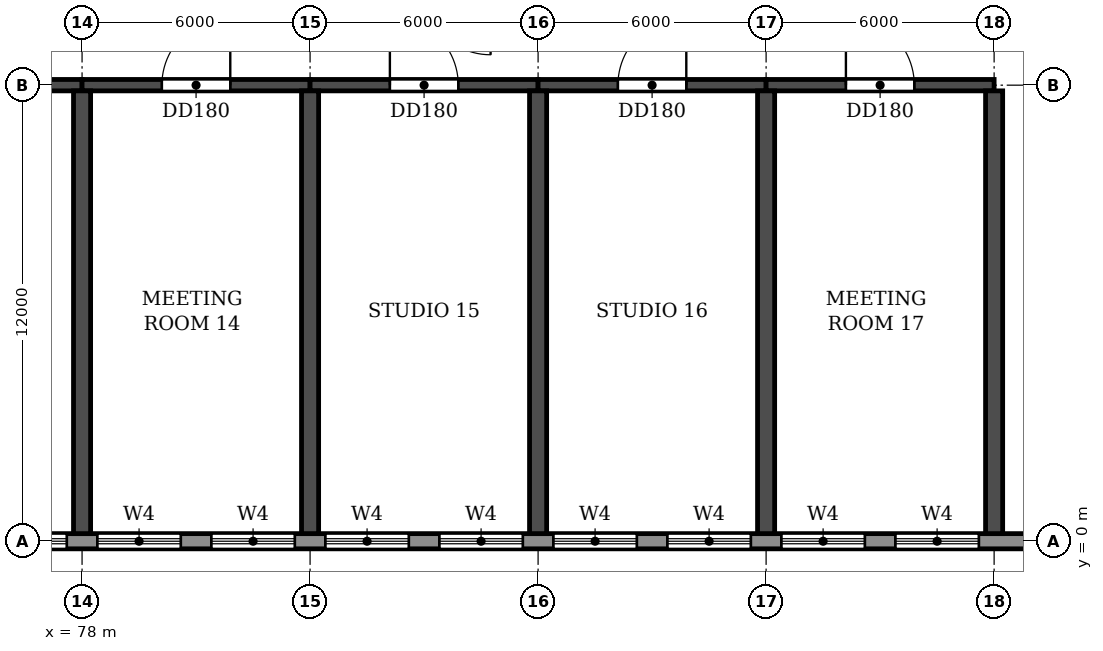
"""IFC4 building model, lengths in metres.
Left out: names, types, materials, properties, quantities, classifications, styles, units other than length and angle.
Written with IfcOpenShell. Run it as: python <this file> out.ifc"""

import sys

from ifc_helpers import new_model, si_unit, direction, frame, frame_2d, origin, place, context, subcontext, project, spatial, rectangle, extrude, element, fill, save


model = new_model("IFC4")
c1 = context("Model", 3, precision=1e-05, world=origin(), true_north=direction((0.0, 1.0)))
c2 = subcontext(c1, "Body", "Model", "MODEL_VIEW")
j1 = project(units=[si_unit("LENGTHUNIT", "METRE"), si_unit("PLANEANGLEUNIT", "RADIAN")], contexts=[c1])
p1 = place(None, origin())
s1 = spatial("IfcSite", under=j1, at=p1, CompositionType="ELEMENT")
p2 = place(p1, origin())
s2 = spatial("IfcBuilding", under=s1, at=p2, CompositionType="ELEMENT")
p3 = place(p2, frame((0.0, 0.0, 19.2)))
s3 = spatial("IfcBuildingStorey", under=s2, at=p3, CompositionType="ELEMENT", Elevation=19.2)
for number, where, z_axis, x_axis in (
    (1, (78.0, 0.2, 0.0), (0.0, 0.0, 1.0), (0.0, 1.0, 0.0)),
    (2, (84.0, 0.2, 0.0), (0.0, 0.0, 1.0), (0.0, 1.0, 0.0)),
    (3, (90.0, 0.2, 0.0), (0.0, 0.0, 1.0), (0.0, 1.0, 0.0)),
    (4, (96.0, 0.2, 0.0), (0.0, 0.0, 1.0), (0.0, 1.0, 0.0)),
    (5, (102.0, 0.2, 0.0), (0.0, 0.0, 1.0), (0.0, 1.0, 0.0)),
):
    element("IfcWall", number, at=place(p3, frame(where, z_axis=z_axis, x_axis=x_axis)), inside=s3, PredefinedType="SHEAR", context=c2, shape_type="SweptSolid", body=[
        extrude(rectangle(XDim=11.65, YDim=0.45, at=frame_2d((5.825, 0.0))), origin(), (0.0, 0.0, 1.0), 3.95),
    ])
p4 = place(p3, frame((72.0, 12.0, 0.0), z_axis=(0.0, 0.0, 1.0), x_axis=(1.0, 0.0, 0.0)))
e6 = element("IfcWall", 6, at=p4, inside=s3, PredefinedType="SHEAR", context=c2, shape_type="SweptSolid", body=[
    extrude(rectangle(XDim=6.0, YDim=0.3, at=frame_2d((3.0, 0.0))), origin(), (0.0, 0.0, 1.0), 3.35),
])
p5 = place(p4, frame((2.1, 0.0, 0.0)))
e7 = element("IfcOpeningElement", 7, at=p5, cuts=e6, PredefinedType="OPENING", context=c2, shape_type="SweptSolid", body=[
    extrude(rectangle(XDim=1.8, YDim=2.1, at=frame_2d((0.9, 1.05))), frame((0.0, 0.16, 0.0), z_axis=(0.0, -1.0, 0.0), x_axis=(1.0, 0.0, 0.0)), (0.0, 0.0, 1.0), 0.32),
])
p6 = place(p3, frame((78.0, 12.0, 0.0), z_axis=(0.0, 0.0, 1.0), x_axis=(1.0, 0.0, 0.0)))
e8 = element("IfcWall", 8, at=p6, inside=s3, PredefinedType="SHEAR", context=c2, shape_type="SweptSolid", body=[
    extrude(rectangle(XDim=6.0, YDim=0.3, at=frame_2d((3.0, 0.0))), origin(), (0.0, 0.0, 1.0), 3.35),
])
p7 = place(p6, frame((2.1, 0.0, 0.0)))
e9 = element("IfcOpeningElement", 9, at=p7, cuts=e8, PredefinedType="OPENING", context=c2, shape_type="SweptSolid", body=[
    extrude(rectangle(XDim=1.8, YDim=2.1, at=frame_2d((0.9, 1.05))), frame((0.0, 0.16, 0.0), z_axis=(0.0, -1.0, 0.0), x_axis=(1.0, 0.0, 0.0)), (0.0, 0.0, 1.0), 0.32),
])
p8 = place(p3, frame((84.0, 12.0, 0.0), z_axis=(0.0, 0.0, 1.0), x_axis=(1.0, 0.0, 0.0)))
e10 = element("IfcWall", 10, at=p8, inside=s3, PredefinedType="SHEAR", context=c2, shape_type="SweptSolid", body=[
    extrude(rectangle(XDim=6.0, YDim=0.3, at=frame_2d((3.0, 0.0))), origin(), (0.0, 0.0, 1.0), 3.35),
])
p9 = place(p8, frame((2.1, 0.0, 0.0)))
e11 = element("IfcOpeningElement", 11, at=p9, cuts=e10, PredefinedType="OPENING", context=c2, shape_type="SweptSolid", body=[
    extrude(rectangle(XDim=1.8, YDim=2.1, at=frame_2d((0.9, 1.05))), frame((0.0, 0.16, 0.0), z_axis=(0.0, -1.0, 0.0), x_axis=(1.0, 0.0, 0.0)), (0.0, 0.0, 1.0), 0.32),
])
p10 = place(p3, frame((90.0, 12.0, 0.0), z_axis=(0.0, 0.0, 1.0), x_axis=(1.0, 0.0, 0.0)))
e12 = element("IfcWall", 12, at=p10, inside=s3, PredefinedType="SHEAR", context=c2, shape_type="SweptSolid", body=[
    extrude(rectangle(XDim=6.0, YDim=0.3, at=frame_2d((3.0, 0.0))), origin(), (0.0, 0.0, 1.0), 3.35),
])
p11 = place(p10, frame((2.1, 0.0, 0.0)))
e13 = element("IfcOpeningElement", 13, at=p11, cuts=e12, PredefinedType="OPENING", context=c2, shape_type="SweptSolid", body=[
    extrude(rectangle(XDim=1.8, YDim=2.1, at=frame_2d((0.9, 1.05))), frame((0.0, 0.16, 0.0), z_axis=(0.0, -1.0, 0.0), x_axis=(1.0, 0.0, 0.0)), (0.0, 0.0, 1.0), 0.32),
])
p12 = place(p3, frame((96.0, 12.0, 0.0), z_axis=(0.0, 0.0, 1.0), x_axis=(1.0, 0.0, 0.0)))
e14 = element("IfcWall", 14, at=p12, inside=s3, PredefinedType="SHEAR", context=c2, shape_type="SweptSolid", body=[
    extrude(rectangle(XDim=6.0, YDim=0.3, at=frame_2d((3.0, 0.0))), origin(), (0.0, 0.0, 1.0), 3.35),
])
p13 = place(p12, frame((2.1, 0.0, 0.0)))
e15 = element("IfcOpeningElement", 15, at=p13, cuts=e14, PredefinedType="OPENING", context=c2, shape_type="SweptSolid", body=[
    extrude(rectangle(XDim=1.8, YDim=2.1, at=frame_2d((0.9, 1.05))), frame((0.0, 0.16, 0.0), z_axis=(0.0, -1.0, 0.0), x_axis=(1.0, 0.0, 0.0)), (0.0, 0.0, 1.0), 0.32),
])
p14 = place(p3, frame((-3.0, 0.0, 0.0), z_axis=(0.0, 0.0, 1.0), x_axis=(1.0, 0.0, 0.0)))
e16 = element("IfcWall", 16, at=p14, inside=s3, PredefinedType="STANDARD", context=c2, shape_type="SweptSolid", body=[
    extrude(rectangle(XDim=108.0, YDim=0.4, at=frame_2d((54.0, 0.0))), origin(), (0.0, 0.0, 1.0), 3.95),
])
p15 = place(p14, frame((3.4, 0.0, 0.9)))
e17 = element("IfcOpeningElement", 17, at=p15, cuts=e16, PredefinedType="OPENING", context=c2, shape_type="SweptSolid", body=[
    extrude(rectangle(XDim=2.2, YDim=2.7, at=frame_2d((1.1, 1.35))), frame((0.0, 0.21, 0.0), z_axis=(0.0, -1.0, 0.0), x_axis=(1.0, 0.0, 0.0)), (0.0, 0.0, 1.0), 0.42),
])
p16 = place(p14, frame((6.4, 0.0, 0.9)))
e18 = element("IfcOpeningElement", 18, at=p16, cuts=e16, PredefinedType="OPENING", context=c2, shape_type="SweptSolid", body=[
    extrude(rectangle(XDim=2.2, YDim=2.7, at=frame_2d((1.1, 1.35))), frame((0.0, 0.21, 0.0), z_axis=(0.0, -1.0, 0.0), x_axis=(1.0, 0.0, 0.0)), (0.0, 0.0, 1.0), 0.42),
])
p17 = place(p14, frame((9.4, 0.0, 0.9)))
e19 = element("IfcOpeningElement", 19, at=p17, cuts=e16, PredefinedType="OPENING", context=c2, shape_type="SweptSolid", body=[
    extrude(rectangle(XDim=2.2, YDim=2.7, at=frame_2d((1.1, 1.35))), frame((0.0, 0.21, 0.0), z_axis=(0.0, -1.0, 0.0), x_axis=(1.0, 0.0, 0.0)), (0.0, 0.0, 1.0), 0.42),
])
p18 = place(p14, frame((12.4, 0.0, 0.9)))
e20 = element("IfcOpeningElement", 20, at=p18, cuts=e16, PredefinedType="OPENING", context=c2, shape_type="SweptSolid", body=[
    extrude(rectangle(XDim=2.2, YDim=2.7, at=frame_2d((1.1, 1.35))), frame((0.0, 0.21, 0.0), z_axis=(0.0, -1.0, 0.0), x_axis=(1.0, 0.0, 0.0)), (0.0, 0.0, 1.0), 0.42),
])
p19 = place(p14, frame((15.4, 0.0, 0.9)))
e21 = element("IfcOpeningElement", 21, at=p19, cuts=e16, PredefinedType="OPENING", context=c2, shape_type="SweptSolid", body=[
    extrude(rectangle(XDim=2.2, YDim=2.7, at=frame_2d((1.1, 1.35))), frame((0.0, 0.21, 0.0), z_axis=(0.0, -1.0, 0.0), x_axis=(1.0, 0.0, 0.0)), (0.0, 0.0, 1.0), 0.42),
])
p20 = place(p14, frame((18.4, 0.0, 0.9)))
e22 = element("IfcOpeningElement", 22, at=p20, cuts=e16, PredefinedType="OPENING", context=c2, shape_type="SweptSolid", body=[
    extrude(rectangle(XDim=2.2, YDim=2.7, at=frame_2d((1.1, 1.35))), frame((0.0, 0.21, 0.0), z_axis=(0.0, -1.0, 0.0), x_axis=(1.0, 0.0, 0.0)), (0.0, 0.0, 1.0), 0.42),
])
p21 = place(p14, frame((21.4, 0.0, 0.9)))
e23 = element("IfcOpeningElement", 23, at=p21, cuts=e16, PredefinedType="OPENING", context=c2, shape_type="SweptSolid", body=[
    extrude(rectangle(XDim=2.2, YDim=2.7, at=frame_2d((1.1, 1.35))), frame((0.0, 0.21, 0.0), z_axis=(0.0, -1.0, 0.0), x_axis=(1.0, 0.0, 0.0)), (0.0, 0.0, 1.0), 0.42),
])
p22 = place(p14, frame((24.4, 0.0, 0.9)))
e24 = element("IfcOpeningElement", 24, at=p22, cuts=e16, PredefinedType="OPENING", context=c2, shape_type="SweptSolid", body=[
    extrude(rectangle(XDim=2.2, YDim=2.7, at=frame_2d((1.1, 1.35))), frame((0.0, 0.21, 0.0), z_axis=(0.0, -1.0, 0.0), x_axis=(1.0, 0.0, 0.0)), (0.0, 0.0, 1.0), 0.42),
])
p23 = place(p14, frame((27.4, 0.0, 0.9)))
e25 = element("IfcOpeningElement", 25, at=p23, cuts=e16, PredefinedType="OPENING", context=c2, shape_type="SweptSolid", body=[
    extrude(rectangle(XDim=2.2, YDim=2.7, at=frame_2d((1.1, 1.35))), frame((0.0, 0.21, 0.0), z_axis=(0.0, -1.0, 0.0), x_axis=(1.0, 0.0, 0.0)), (0.0, 0.0, 1.0), 0.42),
])
p24 = place(p14, frame((30.4, 0.0, 0.9)))
e26 = element("IfcOpeningElement", 26, at=p24, cuts=e16, PredefinedType="OPENING", context=c2, shape_type="SweptSolid", body=[
    extrude(rectangle(XDim=2.2, YDim=2.7, at=frame_2d((1.1, 1.35))), frame((0.0, 0.21, 0.0), z_axis=(0.0, -1.0, 0.0), x_axis=(1.0, 0.0, 0.0)), (0.0, 0.0, 1.0), 0.42),
])
p25 = place(p14, frame((33.4, 0.0, 0.9)))
e27 = element("IfcOpeningElement", 27, at=p25, cuts=e16, PredefinedType="OPENING", context=c2, shape_type="SweptSolid", body=[
    extrude(rectangle(XDim=2.2, YDim=2.7, at=frame_2d((1.1, 1.35))), frame((0.0, 0.21, 0.0), z_axis=(0.0, -1.0, 0.0), x_axis=(1.0, 0.0, 0.0)), (0.0, 0.0, 1.0), 0.42),
])
p26 = place(p14, frame((36.4, 0.0, 0.9)))
e28 = element("IfcOpeningElement", 28, at=p26, cuts=e16, PredefinedType="OPENING", context=c2, shape_type="SweptSolid", body=[
    extrude(rectangle(XDim=2.2, YDim=2.7, at=frame_2d((1.1, 1.35))), frame((0.0, 0.21, 0.0), z_axis=(0.0, -1.0, 0.0), x_axis=(1.0, 0.0, 0.0)), (0.0, 0.0, 1.0), 0.42),
])
p27 = place(p14, frame((39.4, 0.0, 0.9)))
e29 = element("IfcOpeningElement", 29, at=p27, cuts=e16, PredefinedType="OPENING", context=c2, shape_type="SweptSolid", body=[
    extrude(rectangle(XDim=2.2, YDim=2.7, at=frame_2d((1.1, 1.35))), frame((0.0, 0.21, 0.0), z_axis=(0.0, -1.0, 0.0), x_axis=(1.0, 0.0, 0.0)), (0.0, 0.0, 1.0), 0.42),
])
p28 = place(p14, frame((42.4, 0.0, 0.9)))
e30 = element("IfcOpeningElement", 30, at=p28, cuts=e16, PredefinedType="OPENING", context=c2, shape_type="SweptSolid", body=[
    extrude(rectangle(XDim=2.2, YDim=2.7, at=frame_2d((1.1, 1.35))), frame((0.0, 0.21, 0.0), z_axis=(0.0, -1.0, 0.0), x_axis=(1.0, 0.0, 0.0)), (0.0, 0.0, 1.0), 0.42),
])
p29 = place(p14, frame((45.4, 0.0, 0.9)))
e31 = element("IfcOpeningElement", 31, at=p29, cuts=e16, PredefinedType="OPENING", context=c2, shape_type="SweptSolid", body=[
    extrude(rectangle(XDim=2.2, YDim=2.7, at=frame_2d((1.1, 1.35))), frame((0.0, 0.21, 0.0), z_axis=(0.0, -1.0, 0.0), x_axis=(1.0, 0.0, 0.0)), (0.0, 0.0, 1.0), 0.42),
])
p30 = place(p14, frame((48.4, 0.0, 0.9)))
e32 = element("IfcOpeningElement", 32, at=p30, cuts=e16, PredefinedType="OPENING", context=c2, shape_type="SweptSolid", body=[
    extrude(rectangle(XDim=2.2, YDim=2.7, at=frame_2d((1.1, 1.35))), frame((0.0, 0.21, 0.0), z_axis=(0.0, -1.0, 0.0), x_axis=(1.0, 0.0, 0.0)), (0.0, 0.0, 1.0), 0.42),
])
p31 = place(p14, frame((51.4, 0.0, 0.9)))
e33 = element("IfcOpeningElement", 33, at=p31, cuts=e16, PredefinedType="OPENING", context=c2, shape_type="SweptSolid", body=[
    extrude(rectangle(XDim=2.2, YDim=2.7, at=frame_2d((1.1, 1.35))), frame((0.0, 0.21, 0.0), z_axis=(0.0, -1.0, 0.0), x_axis=(1.0, 0.0, 0.0)), (0.0, 0.0, 1.0), 0.42),
])
p32 = place(p14, frame((54.4, 0.0, 0.9)))
e34 = element("IfcOpeningElement", 34, at=p32, cuts=e16, PredefinedType="OPENING", context=c2, shape_type="SweptSolid", body=[
    extrude(rectangle(XDim=2.2, YDim=2.7, at=frame_2d((1.1, 1.35))), frame((0.0, 0.21, 0.0), z_axis=(0.0, -1.0, 0.0), x_axis=(1.0, 0.0, 0.0)), (0.0, 0.0, 1.0), 0.42),
])
p33 = place(p14, frame((57.4, 0.0, 0.9)))
e35 = element("IfcOpeningElement", 35, at=p33, cuts=e16, PredefinedType="OPENING", context=c2, shape_type="SweptSolid", body=[
    extrude(rectangle(XDim=2.2, YDim=2.7, at=frame_2d((1.1, 1.35))), frame((0.0, 0.21, 0.0), z_axis=(0.0, -1.0, 0.0), x_axis=(1.0, 0.0, 0.0)), (0.0, 0.0, 1.0), 0.42),
])
p34 = place(p14, frame((60.4, 0.0, 0.9)))
e36 = element("IfcOpeningElement", 36, at=p34, cuts=e16, PredefinedType="OPENING", context=c2, shape_type="SweptSolid", body=[
    extrude(rectangle(XDim=2.2, YDim=2.7, at=frame_2d((1.1, 1.35))), frame((0.0, 0.21, 0.0), z_axis=(0.0, -1.0, 0.0), x_axis=(1.0, 0.0, 0.0)), (0.0, 0.0, 1.0), 0.42),
])
p35 = place(p14, frame((63.4, 0.0, 0.9)))
e37 = element("IfcOpeningElement", 37, at=p35, cuts=e16, PredefinedType="OPENING", context=c2, shape_type="SweptSolid", body=[
    extrude(rectangle(XDim=2.2, YDim=2.7, at=frame_2d((1.1, 1.35))), frame((0.0, 0.21, 0.0), z_axis=(0.0, -1.0, 0.0), x_axis=(1.0, 0.0, 0.0)), (0.0, 0.0, 1.0), 0.42),
])
p36 = place(p14, frame((66.4, 0.0, 0.9)))
e38 = element("IfcOpeningElement", 38, at=p36, cuts=e16, PredefinedType="OPENING", context=c2, shape_type="SweptSolid", body=[
    extrude(rectangle(XDim=2.2, YDim=2.7, at=frame_2d((1.1, 1.35))), frame((0.0, 0.21, 0.0), z_axis=(0.0, -1.0, 0.0), x_axis=(1.0, 0.0, 0.0)), (0.0, 0.0, 1.0), 0.42),
])
p37 = place(p14, frame((69.4, 0.0, 0.9)))
e39 = element("IfcOpeningElement", 39, at=p37, cuts=e16, PredefinedType="OPENING", context=c2, shape_type="SweptSolid", body=[
    extrude(rectangle(XDim=2.2, YDim=2.7, at=frame_2d((1.1, 1.35))), frame((0.0, 0.21, 0.0), z_axis=(0.0, -1.0, 0.0), x_axis=(1.0, 0.0, 0.0)), (0.0, 0.0, 1.0), 0.42),
])
p38 = place(p14, frame((72.4, 0.0, 0.9)))
e40 = element("IfcOpeningElement", 40, at=p38, cuts=e16, PredefinedType="OPENING", context=c2, shape_type="SweptSolid", body=[
    extrude(rectangle(XDim=2.2, YDim=2.7, at=frame_2d((1.1, 1.35))), frame((0.0, 0.21, 0.0), z_axis=(0.0, -1.0, 0.0), x_axis=(1.0, 0.0, 0.0)), (0.0, 0.0, 1.0), 0.42),
])
p39 = place(p14, frame((75.4, 0.0, 0.9)))
e41 = element("IfcOpeningElement", 41, at=p39, cuts=e16, PredefinedType="OPENING", context=c2, shape_type="SweptSolid", body=[
    extrude(rectangle(XDim=2.2, YDim=2.7, at=frame_2d((1.1, 1.35))), frame((0.0, 0.21, 0.0), z_axis=(0.0, -1.0, 0.0), x_axis=(1.0, 0.0, 0.0)), (0.0, 0.0, 1.0), 0.42),
])
p40 = place(p14, frame((78.4, 0.0, 0.9)))
e42 = element("IfcOpeningElement", 42, at=p40, cuts=e16, PredefinedType="OPENING", context=c2, shape_type="SweptSolid", body=[
    extrude(rectangle(XDim=2.2, YDim=2.7, at=frame_2d((1.1, 1.35))), frame((0.0, 0.21, 0.0), z_axis=(0.0, -1.0, 0.0), x_axis=(1.0, 0.0, 0.0)), (0.0, 0.0, 1.0), 0.42),
])
p41 = place(p14, frame((81.4, 0.0, 0.9)))
e43 = element("IfcOpeningElement", 43, at=p41, cuts=e16, PredefinedType="OPENING", context=c2, shape_type="SweptSolid", body=[
    extrude(rectangle(XDim=2.2, YDim=2.7, at=frame_2d((1.1, 1.35))), frame((0.0, 0.21, 0.0), z_axis=(0.0, -1.0, 0.0), x_axis=(1.0, 0.0, 0.0)), (0.0, 0.0, 1.0), 0.42),
])
p42 = place(p14, frame((84.4, 0.0, 0.9)))
e44 = element("IfcOpeningElement", 44, at=p42, cuts=e16, PredefinedType="OPENING", context=c2, shape_type="SweptSolid", body=[
    extrude(rectangle(XDim=2.2, YDim=2.7, at=frame_2d((1.1, 1.35))), frame((0.0, 0.21, 0.0), z_axis=(0.0, -1.0, 0.0), x_axis=(1.0, 0.0, 0.0)), (0.0, 0.0, 1.0), 0.42),
])
p43 = place(p14, frame((87.4, 0.0, 0.9)))
e45 = element("IfcOpeningElement", 45, at=p43, cuts=e16, PredefinedType="OPENING", context=c2, shape_type="SweptSolid", body=[
    extrude(rectangle(XDim=2.2, YDim=2.7, at=frame_2d((1.1, 1.35))), frame((0.0, 0.21, 0.0), z_axis=(0.0, -1.0, 0.0), x_axis=(1.0, 0.0, 0.0)), (0.0, 0.0, 1.0), 0.42),
])
p44 = place(p14, frame((90.4, 0.0, 0.9)))
e46 = element("IfcOpeningElement", 46, at=p44, cuts=e16, PredefinedType="OPENING", context=c2, shape_type="SweptSolid", body=[
    extrude(rectangle(XDim=2.2, YDim=2.7, at=frame_2d((1.1, 1.35))), frame((0.0, 0.21, 0.0), z_axis=(0.0, -1.0, 0.0), x_axis=(1.0, 0.0, 0.0)), (0.0, 0.0, 1.0), 0.42),
])
p45 = place(p14, frame((93.4, 0.0, 0.9)))
e47 = element("IfcOpeningElement", 47, at=p45, cuts=e16, PredefinedType="OPENING", context=c2, shape_type="SweptSolid", body=[
    extrude(rectangle(XDim=2.2, YDim=2.7, at=frame_2d((1.1, 1.35))), frame((0.0, 0.21, 0.0), z_axis=(0.0, -1.0, 0.0), x_axis=(1.0, 0.0, 0.0)), (0.0, 0.0, 1.0), 0.42),
])
p46 = place(p14, frame((96.4, 0.0, 0.9)))
e48 = element("IfcOpeningElement", 48, at=p46, cuts=e16, PredefinedType="OPENING", context=c2, shape_type="SweptSolid", body=[
    extrude(rectangle(XDim=2.2, YDim=2.7, at=frame_2d((1.1, 1.35))), frame((0.0, 0.21, 0.0), z_axis=(0.0, -1.0, 0.0), x_axis=(1.0, 0.0, 0.0)), (0.0, 0.0, 1.0), 0.42),
])
p47 = place(p14, frame((99.4, 0.0, 0.9)))
e49 = element("IfcOpeningElement", 49, at=p47, cuts=e16, PredefinedType="OPENING", context=c2, shape_type="SweptSolid", body=[
    extrude(rectangle(XDim=2.2, YDim=2.7, at=frame_2d((1.1, 1.35))), frame((0.0, 0.21, 0.0), z_axis=(0.0, -1.0, 0.0), x_axis=(1.0, 0.0, 0.0)), (0.0, 0.0, 1.0), 0.42),
])
p48 = place(p14, frame((102.4, 0.0, 0.9)))
e50 = element("IfcOpeningElement", 50, at=p48, cuts=e16, PredefinedType="OPENING", context=c2, shape_type="SweptSolid", body=[
    extrude(rectangle(XDim=2.2, YDim=2.7, at=frame_2d((1.1, 1.35))), frame((0.0, 0.21, 0.0), z_axis=(0.0, -1.0, 0.0), x_axis=(1.0, 0.0, 0.0)), (0.0, 0.0, 1.0), 0.42),
])
p49 = place(p40, origin())
e51 = element("IfcWindow", 51, at=p49, inside=s3, PartitioningType="DOUBLE_PANEL_HORIZONTAL", PredefinedType="WINDOW", context=c2, shape_type="SweptSolid", body=[
    extrude(rectangle(XDim=2.2, YDim=2.7, at=frame_2d((1.1, 1.35))), frame((0.0, 0.03, 0.0), z_axis=(0.0, -1.0, 0.0), x_axis=(1.0, 0.0, 0.0)), (0.0, 0.0, 1.0), 0.06),
])
fill(e42, e51)
p50 = place(p41, origin())
e52 = element("IfcWindow", 52, at=p50, inside=s3, PartitioningType="DOUBLE_PANEL_HORIZONTAL", PredefinedType="WINDOW", context=c2, shape_type="SweptSolid", body=[
    extrude(rectangle(XDim=2.2, YDim=2.7, at=frame_2d((1.1, 1.35))), frame((0.0, 0.03, 0.0), z_axis=(0.0, -1.0, 0.0), x_axis=(1.0, 0.0, 0.0)), (0.0, 0.0, 1.0), 0.06),
])
fill(e43, e52)
p51 = place(p42, origin())
e53 = element("IfcWindow", 53, at=p51, inside=s3, PartitioningType="DOUBLE_PANEL_HORIZONTAL", PredefinedType="WINDOW", context=c2, shape_type="SweptSolid", body=[
    extrude(rectangle(XDim=2.2, YDim=2.7, at=frame_2d((1.1, 1.35))), frame((0.0, 0.03, 0.0), z_axis=(0.0, -1.0, 0.0), x_axis=(1.0, 0.0, 0.0)), (0.0, 0.0, 1.0), 0.06),
])
fill(e44, e53)
p52 = place(p43, origin())
e54 = element("IfcWindow", 54, at=p52, inside=s3, PartitioningType="DOUBLE_PANEL_HORIZONTAL", PredefinedType="WINDOW", context=c2, shape_type="SweptSolid", body=[
    extrude(rectangle(XDim=2.2, YDim=2.7, at=frame_2d((1.1, 1.35))), frame((0.0, 0.03, 0.0), z_axis=(0.0, -1.0, 0.0), x_axis=(1.0, 0.0, 0.0)), (0.0, 0.0, 1.0), 0.06),
])
fill(e45, e54)
p53 = place(p44, origin())
e55 = element("IfcWindow", 55, at=p53, inside=s3, PartitioningType="DOUBLE_PANEL_HORIZONTAL", PredefinedType="WINDOW", context=c2, shape_type="SweptSolid", body=[
    extrude(rectangle(XDim=2.2, YDim=2.7, at=frame_2d((1.1, 1.35))), frame((0.0, 0.03, 0.0), z_axis=(0.0, -1.0, 0.0), x_axis=(1.0, 0.0, 0.0)), (0.0, 0.0, 1.0), 0.06),
])
fill(e46, e55)
p54 = place(p45, origin())
e56 = element("IfcWindow", 56, at=p54, inside=s3, PartitioningType="DOUBLE_PANEL_HORIZONTAL", PredefinedType="WINDOW", context=c2, shape_type="SweptSolid", body=[
    extrude(rectangle(XDim=2.2, YDim=2.7, at=frame_2d((1.1, 1.35))), frame((0.0, 0.03, 0.0), z_axis=(0.0, -1.0, 0.0), x_axis=(1.0, 0.0, 0.0)), (0.0, 0.0, 1.0), 0.06),
])
fill(e47, e56)
p55 = place(p46, origin())
e57 = element("IfcWindow", 57, at=p55, inside=s3, PartitioningType="DOUBLE_PANEL_HORIZONTAL", PredefinedType="WINDOW", context=c2, shape_type="SweptSolid", body=[
    extrude(rectangle(XDim=2.2, YDim=2.7, at=frame_2d((1.1, 1.35))), frame((0.0, 0.03, 0.0), z_axis=(0.0, -1.0, 0.0), x_axis=(1.0, 0.0, 0.0)), (0.0, 0.0, 1.0), 0.06),
])
fill(e48, e57)
p56 = place(p47, origin())
e58 = element("IfcWindow", 58, at=p56, inside=s3, PartitioningType="DOUBLE_PANEL_HORIZONTAL", PredefinedType="WINDOW", context=c2, shape_type="SweptSolid", body=[
    extrude(rectangle(XDim=2.2, YDim=2.7, at=frame_2d((1.1, 1.35))), frame((0.0, 0.03, 0.0), z_axis=(0.0, -1.0, 0.0), x_axis=(1.0, 0.0, 0.0)), (0.0, 0.0, 1.0), 0.06),
])
fill(e49, e58)
p57 = place(p48, origin())
e59 = element("IfcWindow", 59, at=p57, inside=s3, PartitioningType="DOUBLE_PANEL_HORIZONTAL", PredefinedType="WINDOW", context=c2, shape_type="SweptSolid", body=[
    extrude(rectangle(XDim=2.2, YDim=2.7, at=frame_2d((1.1, 1.35))), frame((0.0, 0.03, 0.0), z_axis=(0.0, -1.0, 0.0), x_axis=(1.0, 0.0, 0.0)), (0.0, 0.0, 1.0), 0.06),
])
fill(e50, e59)
p58 = place(p7, origin())
e60 = element("IfcDoor", 60, at=p58, inside=s3, OperationType="DOUBLE_DOOR_SINGLE_SWING", PredefinedType="DOOR", context=c2, shape_type="SweptSolid", body=[
    extrude(rectangle(XDim=1.8, YDim=2.1, at=frame_2d((0.9, 1.05))), frame((0.0, 0.025, 0.0), z_axis=(0.0, -1.0, 0.0), x_axis=(1.0, 0.0, 0.0)), (0.0, 0.0, 1.0), 0.05),
])
fill(e9, e60)
p59 = place(p9, origin())
e61 = element("IfcDoor", 61, at=p59, inside=s3, OperationType="DOUBLE_DOOR_SINGLE_SWING", PredefinedType="DOOR", context=c2, shape_type="SweptSolid", body=[
    extrude(rectangle(XDim=1.8, YDim=2.1, at=frame_2d((0.9, 1.05))), frame((0.0, 0.025, 0.0), z_axis=(0.0, -1.0, 0.0), x_axis=(1.0, 0.0, 0.0)), (0.0, 0.0, 1.0), 0.05),
])
fill(e11, e61)
p60 = place(p11, origin())
e62 = element("IfcDoor", 62, at=p60, inside=s3, OperationType="DOUBLE_DOOR_SINGLE_SWING", PredefinedType="DOOR", context=c2, shape_type="SweptSolid", body=[
    extrude(rectangle(XDim=1.8, YDim=2.1, at=frame_2d((0.9, 1.05))), frame((0.0, 0.025, 0.0), z_axis=(0.0, -1.0, 0.0), x_axis=(1.0, 0.0, 0.0)), (0.0, 0.0, 1.0), 0.05),
])
fill(e13, e62)
p61 = place(p13, origin())
e63 = element("IfcDoor", 63, at=p61, inside=s3, OperationType="DOUBLE_DOOR_SINGLE_SWING", PredefinedType="DOOR", context=c2, shape_type="SweptSolid", body=[
    extrude(rectangle(XDim=1.8, YDim=2.1, at=frame_2d((0.9, 1.05))), frame((0.0, 0.025, 0.0), z_axis=(0.0, -1.0, 0.0), x_axis=(1.0, 0.0, 0.0)), (0.0, 0.0, 1.0), 0.05),
])
fill(e15, e63)
save(model, sys.argv[1])
